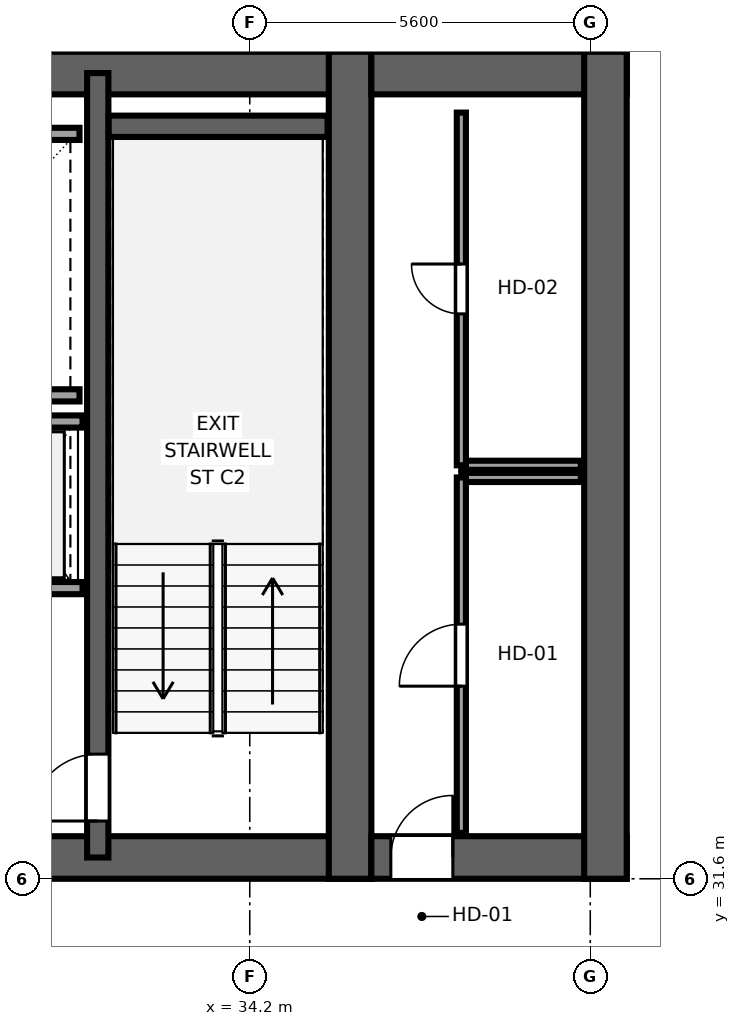
"""IFC4 building model, lengths in metres.
Left out: names, types, materials, properties, quantities, classifications, styles, units other than length and angle.
Written with IfcOpenShell. Run it as: python <this file> out.ifc"""

import sys

from ifc_helpers import new_model, si_unit, direction, frame, frame_2d, origin, place, context, subcontext, project, spatial, rectangle, extrude, source, transform, mapped, element, fill, save


model = new_model("IFC4")
c1 = context("Model", 3, precision=1e-05, world=origin(), true_north=direction((0.0, 1.0)))
c2 = subcontext(c1, "Body", "Model", "MODEL_VIEW")
j1 = project(units=[si_unit("LENGTHUNIT", "METRE"), si_unit("PLANEANGLEUNIT", "RADIAN")], contexts=[c1])
p1 = place(None, origin())
s1 = spatial("IfcSite", under=j1, at=p1, CompositionType="ELEMENT")
p2 = place(p1, origin())
s2 = spatial("IfcBuilding", under=s1, at=p2, CompositionType="ELEMENT")
p3 = place(p2, frame((0.0, 0.0, 161.25)))
s3 = spatial("IfcBuildingStorey", under=s2, at=p3, CompositionType="ELEMENT", Elevation=161.25)
p4 = place(p3, frame((9.8, 31.95, 0.0), z_axis=(0.0, 0.0, 1.0), x_axis=(1.0, 0.0, 0.0)))
e1 = element("IfcWall", 1, at=p4, inside=s3, PredefinedType="SHEAR", context=c2, shape_type="SweptSolid", body=[
    extrude(rectangle(XDim=26.4, YDim=0.7, at=frame_2d((13.2, 0.0))), origin(), (0.0, 0.0, 1.0), 3.55),
])
p5 = place(p4, frame((7.65, 0.0, 0.0), z_axis=(0.0, 0.0, 1.0), x_axis=(-1.0, 0.0, 0.0)))
e2 = element("IfcOpeningElement", 2, at=p5, cuts=e1, PredefinedType="OPENING", context=c2, shape_type="SweptSolid", body=[
    extrude(rectangle(XDim=1.5, YDim=2.04, at=frame_2d((0.75, 1.02))), frame((0.0, 0.36, 0.0), z_axis=(0.0, -1.0, 0.0), x_axis=(1.0, 0.0, 0.0)), (0.0, 0.0, 1.0), 0.72),
])
p6 = place(p4, frame((13.95, 0.0, 0.0), z_axis=(0.0, 0.0, 1.0), x_axis=(-1.0, 0.0, 0.0)))
e3 = element("IfcOpeningElement", 3, at=p6, cuts=e1, PredefinedType="OPENING", context=c2, shape_type="SweptSolid", body=[
    extrude(rectangle(XDim=1.5, YDim=2.04, at=frame_2d((0.75, 1.02))), frame((0.0, 0.36, 0.0), z_axis=(0.0, -1.0, 0.0), x_axis=(1.0, 0.0, 0.0)), (0.0, 0.0, 1.0), 0.72),
])
p7 = place(p4, frame((20.25, 0.0, 0.0), z_axis=(0.0, 0.0, 1.0), x_axis=(-1.0, 0.0, 0.0)))
e4 = element("IfcOpeningElement", 4, at=p7, cuts=e1, PredefinedType="OPENING", context=c2, shape_type="SweptSolid", body=[
    extrude(rectangle(XDim=1.5, YDim=2.04, at=frame_2d((0.75, 1.02))), frame((0.0, 0.36, 0.0), z_axis=(0.0, -1.0, 0.0), x_axis=(1.0, 0.0, 0.0)), (0.0, 0.0, 1.0), 0.72),
])
p8 = place(p3, frame((9.8, 44.85, 0.0), z_axis=(0.0, 0.0, 1.0), x_axis=(1.0, 0.0, 0.0)))
e5 = element("IfcWall", 5, at=p8, inside=s3, PredefinedType="SHEAR", context=c2, shape_type="SweptSolid", body=[
    extrude(rectangle(XDim=26.4, YDim=0.7, at=frame_2d((13.2, 0.0))), origin(), (0.0, 0.0, 1.0), 3.55),
])
p9 = place(p3, frame((35.85, 31.6, 0.0), z_axis=(0.0, 0.0, 1.0), x_axis=(0.0, 1.0, 0.0)))
e6 = element("IfcWall", 6, at=p9, inside=s3, PredefinedType="SHEAR", context=c2, shape_type="SweptSolid", body=[
    extrude(rectangle(XDim=13.6, YDim=0.7, at=frame_2d((6.8, 0.0))), origin(), (0.0, 0.0, 1.0), 3.55),
])
p10 = place(p3, frame((31.7, 31.95, 0.0), z_axis=(0.0, 0.0, 1.0), x_axis=(0.0, 1.0, 0.0)))
e7 = element("IfcWall", 7, at=p10, inside=s3, PredefinedType="SHEAR", context=c2, shape_type="SweptSolid", body=[
    extrude(rectangle(XDim=12.9, YDim=0.35, at=frame_2d((6.45, 0.0))), origin(), (0.0, 0.0, 1.0), 3.55),
])
p11 = place(p10, frame((1.7, 0.0, 0.0), z_axis=(0.0, 0.0, 1.0), x_axis=(-1.0, 0.0, 0.0)))
e8 = element("IfcOpeningElement", 8, at=p11, cuts=e7, PredefinedType="OPENING", context=c2, shape_type="SweptSolid", body=[
    extrude(rectangle(XDim=1.1, YDim=2.12, at=frame_2d((0.55, 1.06))), frame((0.0, 0.185, 0.0), z_axis=(0.0, -1.0, 0.0), x_axis=(1.0, 0.0, 0.0)), (0.0, 0.0, 1.0), 0.37),
])
p12 = place(p3, frame((36.2, 31.95, 0.0), z_axis=(0.0, 0.0, 1.0), x_axis=(1.0, 0.0, 0.0)))
e9 = element("IfcWall", 9, at=p12, inside=s3, PredefinedType="SHEAR", context=c2, shape_type="SweptSolid", body=[
    extrude(rectangle(XDim=4.2, YDim=0.7, at=frame_2d((2.1, 0.0))), origin(), (0.0, 0.0, 1.0), 3.55),
])
p13 = place(p12, frame((1.34, 0.0, 0.0), z_axis=(0.0, 0.0, 1.0), x_axis=(-1.0, 0.0, 0.0)))
e10 = element("IfcOpeningElement", 10, at=p13, cuts=e9, PredefinedType="OPENING", context=c2, shape_type="SweptSolid", body=[
    extrude(rectangle(XDim=1.02, YDim=2.03, at=frame_2d((0.51, 1.015))), frame((0.0, 0.36, 0.0), z_axis=(0.0, -1.0, 0.0), x_axis=(1.0, 0.0, 0.0)), (0.0, 0.0, 1.0), 0.72),
])
p14 = place(p3, frame((36.2, 44.85, 0.0), z_axis=(0.0, 0.0, 1.0), x_axis=(1.0, 0.0, 0.0)))
e11 = element("IfcWall", 11, at=p14, inside=s3, PredefinedType="SHEAR", context=c2, shape_type="SweptSolid", body=[
    extrude(rectangle(XDim=4.2, YDim=0.7, at=frame_2d((2.1, 0.0))), origin(), (0.0, 0.0, 1.0), 3.55),
])
p15 = place(p3, frame((40.05, 31.6, 0.0), z_axis=(0.0, 0.0, 1.0), x_axis=(0.0, 1.0, 0.0)))
e12 = element("IfcWall", 12, at=p15, inside=s3, PredefinedType="SHEAR", context=c2, shape_type="SweptSolid", body=[
    extrude(rectangle(XDim=13.6, YDim=0.7, at=frame_2d((6.8, 0.0))), origin(), (0.0, 0.0, 1.0), 3.55),
])
p16 = place(p3, frame((31.88, 43.975, 0.0), z_axis=(0.0, 0.0, 1.0), x_axis=(1.0, 0.0, 0.0)))
e13 = element("IfcWall", 13, at=p16, inside=s3, PredefinedType="SHEAR", context=c2, shape_type="SweptSolid", body=[
    extrude(rectangle(XDim=3.6, YDim=0.35, at=frame_2d((1.8, 0.0))), origin(), (0.0, 0.0, 1.0), 3.55),
])
for number, where, z_axis, x_axis in (
    (14, (27.3, 39.55, 0.0), (0.0, 0.0, 1.0), (1.0, 0.0, 0.0)),
    (15, (27.3, 43.85, 0.0), (0.0, 0.0, 1.0), (1.0, 0.0, 0.0)),
):
    element("IfcWall", number, at=place(p3, frame(where, z_axis=z_axis, x_axis=x_axis)), inside=s3, PredefinedType="SOLIDWALL", context=c2, shape_type="SweptSolid", body=[
        extrude(rectangle(XDim=4.1, YDim=0.2, at=frame_2d((2.05, 0.0))), origin(), (0.0, 0.0, 1.0), 3.37),
    ])
p17 = place(p3, frame((27.375, 36.38, 0.0), z_axis=(0.0, 0.0, 1.0), x_axis=(1.0, 0.0, 0.0)))
e16 = element("IfcWall", 16, at=p17, inside=s3, PredefinedType="SOLIDWALL", context=c2, shape_type="SweptSolid", body=[
    extrude(rectangle(XDim=4.075, YDim=0.2, at=frame_2d((2.038, 0.0))), origin(), (0.0, 0.0, 1.0), 3.37),
])
p18 = place(p17, frame((0.525, 0.0, 0.0)))
e17 = element("IfcOpeningElement", 17, at=p18, cuts=e16, PredefinedType="OPENING", context=c2, shape_type="SweptSolid", body=[
    extrude(rectangle(XDim=1.1, YDim=2.12, at=frame_2d((0.55, 1.06))), frame((0.0, 0.11, 0.0), z_axis=(0.0, -1.0, 0.0), x_axis=(1.0, 0.0, 0.0)), (0.0, 0.0, 1.0), 0.22),
])
p19 = place(p17, frame((2.425, 0.0, 0.0)))
e18 = element("IfcOpeningElement", 18, at=p19, cuts=e16, PredefinedType="OPENING", context=c2, shape_type="SweptSolid", body=[
    extrude(rectangle(XDim=1.1, YDim=2.12, at=frame_2d((0.55, 1.06))), frame((0.0, 0.11, 0.0), z_axis=(0.0, -1.0, 0.0), x_axis=(1.0, 0.0, 0.0)), (0.0, 0.0, 1.0), 0.22),
])
p20 = place(p3, frame((27.375, 39.12, 0.0), z_axis=(0.0, 0.0, 1.0), x_axis=(1.0, 0.0, 0.0)))
e19 = element("IfcWall", 19, at=p20, inside=s3, PredefinedType="SOLIDWALL", context=c2, shape_type="SweptSolid", body=[
    extrude(rectangle(XDim=4.075, YDim=0.2, at=frame_2d((2.038, 0.0))), origin(), (0.0, 0.0, 1.0), 3.37),
])
p21 = place(p3, frame((37.68, 38.2, 0.0), z_axis=(0.0, 0.0, 1.0), x_axis=(1.0, 0.0, 0.0)))
e20 = element("IfcWall", 20, at=p21, inside=s3, PredefinedType="PARTITIONING", context=c2, shape_type="SweptSolid", body=[
    extrude(rectangle(XDim=1.965, YDim=0.15, at=frame_2d((0.982, 0.0))), origin(), (0.0, 0.0, 1.0), 3.37),
])
p22 = place(p3, frame((37.68, 32.355, 0.0), z_axis=(0.0, 0.0, 1.0), x_axis=(0.0, 1.0, 0.0)))
e21 = element("IfcWall", 21, at=p22, inside=s3, PredefinedType="PARTITIONING", context=c2, shape_type="SweptSolid", body=[
    extrude(rectangle(XDim=5.845, YDim=0.15, at=frame_2d((2.922, 0.0))), origin(), (0.0, 0.0, 1.0), 3.37),
])
p23 = place(p22, frame((2.413, 0.0, 0.0)))
e22 = element("IfcOpeningElement", 22, at=p23, cuts=e21, PredefinedType="OPENING", context=c2, shape_type="SweptSolid", body=[
    extrude(rectangle(XDim=1.02, YDim=2.03, at=frame_2d((0.51, 1.015))), frame((0.0, 0.085, 0.0), z_axis=(0.0, -1.0, 0.0), x_axis=(1.0, 0.0, 0.0)), (0.0, 0.0, 1.0), 0.17),
])
p24 = place(p3, frame((37.68, 38.4, 0.0), z_axis=(0.0, 0.0, 1.0), x_axis=(1.0, 0.0, 0.0)))
e23 = element("IfcWall", 23, at=p24, inside=s3, PredefinedType="PARTITIONING", context=c2, shape_type="SweptSolid", body=[
    extrude(rectangle(XDim=1.965, YDim=0.15, at=frame_2d((0.982, 0.0))), origin(), (0.0, 0.0, 1.0), 3.37),
])
p25 = place(p3, frame((37.68, 38.4, 0.0), z_axis=(0.0, 0.0, 1.0), x_axis=(0.0, 1.0, 0.0)))
e24 = element("IfcWall", 24, at=p25, inside=s3, PredefinedType="PARTITIONING", context=c2, shape_type="SweptSolid", body=[
    extrude(rectangle(XDim=5.8, YDim=0.15, at=frame_2d((2.9, 0.0))), origin(), (0.0, 0.0, 1.0), 3.37),
])
p26 = place(p25, frame((2.49, 0.0, 0.0)))
e25 = element("IfcOpeningElement", 25, at=p26, cuts=e24, PredefinedType="OPENING", context=c2, shape_type="SweptSolid", body=[
    extrude(rectangle(XDim=0.82, YDim=2.01, at=frame_2d((0.41, 1.005))), frame((0.0, 0.085, 0.0), z_axis=(0.0, -1.0, 0.0), x_axis=(1.0, 0.0, 0.0)), (0.0, 0.0, 1.0), 0.17),
])
m1 = source(origin(), c2, "Body", "SweptSolid", [
    extrude(rectangle(XDim=1.1, YDim=2.12, at=frame_2d((0.55, 1.06))), frame((0.0, 0.025, 0.0), z_axis=(0.0, -1.0, 0.0), x_axis=(1.0, 0.0, 0.0)), (0.0, 0.0, 1.0), 0.05),
])
p27 = place(p11, origin())
e26 = element("IfcDoor", 26, at=p27, inside=s3, OperationType="SINGLE_SWING_LEFT", PredefinedType="DOOR", context=c2, shape_type="MappedRepresentation", body=[
    mapped(m1, transform((0.0, 0.0, 0.0), x_axis=(1.0, 0.0, 0.0), y_axis=(0.0, 1.0, 0.0), z_axis=(0.0, 0.0, 1.0), scale=1.0)),
])
fill(e8, e26)
m2 = source(origin(), c2, "Body", "SweptSolid", [
    extrude(rectangle(XDim=1.02, YDim=2.03, at=frame_2d((0.51, 1.015))), frame((0.0, 0.025, 0.0), z_axis=(0.0, -1.0, 0.0), x_axis=(1.0, 0.0, 0.0)), (0.0, 0.0, 1.0), 0.05),
])
p28 = place(p13, origin())
e27 = element("IfcDoor", 27, at=p28, inside=s3, OperationType="SINGLE_SWING_RIGHT", PredefinedType="DOOR", context=c2, shape_type="MappedRepresentation", body=[
    mapped(m2, transform((0.0, 0.0, 0.0), x_axis=(1.0, 0.0, 0.0), y_axis=(0.0, 1.0, 0.0), z_axis=(0.0, 0.0, 1.0), scale=1.0)),
])
fill(e10, e27)
p29 = place(p23, origin())
e28 = element("IfcDoor", 28, at=p29, inside=s3, OperationType="SINGLE_SWING_LEFT", PredefinedType="DOOR", context=c2, shape_type="MappedRepresentation", body=[
    mapped(m2, transform((0.0, 0.0, 0.0), x_axis=(1.0, 0.0, 0.0), y_axis=(0.0, 1.0, 0.0), z_axis=(0.0, 0.0, 1.0), scale=1.0)),
])
fill(e22, e28)
m3 = source(origin(), c2, "Body", "SweptSolid", [
    extrude(rectangle(XDim=0.82, YDim=2.01, at=frame_2d((0.41, 1.005))), frame((0.0, 0.025, 0.0), z_axis=(0.0, -1.0, 0.0), x_axis=(1.0, 0.0, 0.0)), (0.0, 0.0, 1.0), 0.05),
])
p30 = place(p26, origin())
e29 = element("IfcDoor", 29, at=p30, inside=s3, OperationType="SINGLE_SWING_RIGHT", PredefinedType="DOOR", context=c2, shape_type="MappedRepresentation", body=[
    mapped(m3, transform((0.0, 0.0, 0.0), x_axis=(1.0, 0.0, 0.0), y_axis=(0.0, 1.0, 0.0), z_axis=(0.0, 0.0, 1.0), scale=1.0)),
])
fill(e25, e29)
save(model, sys.argv[1])
